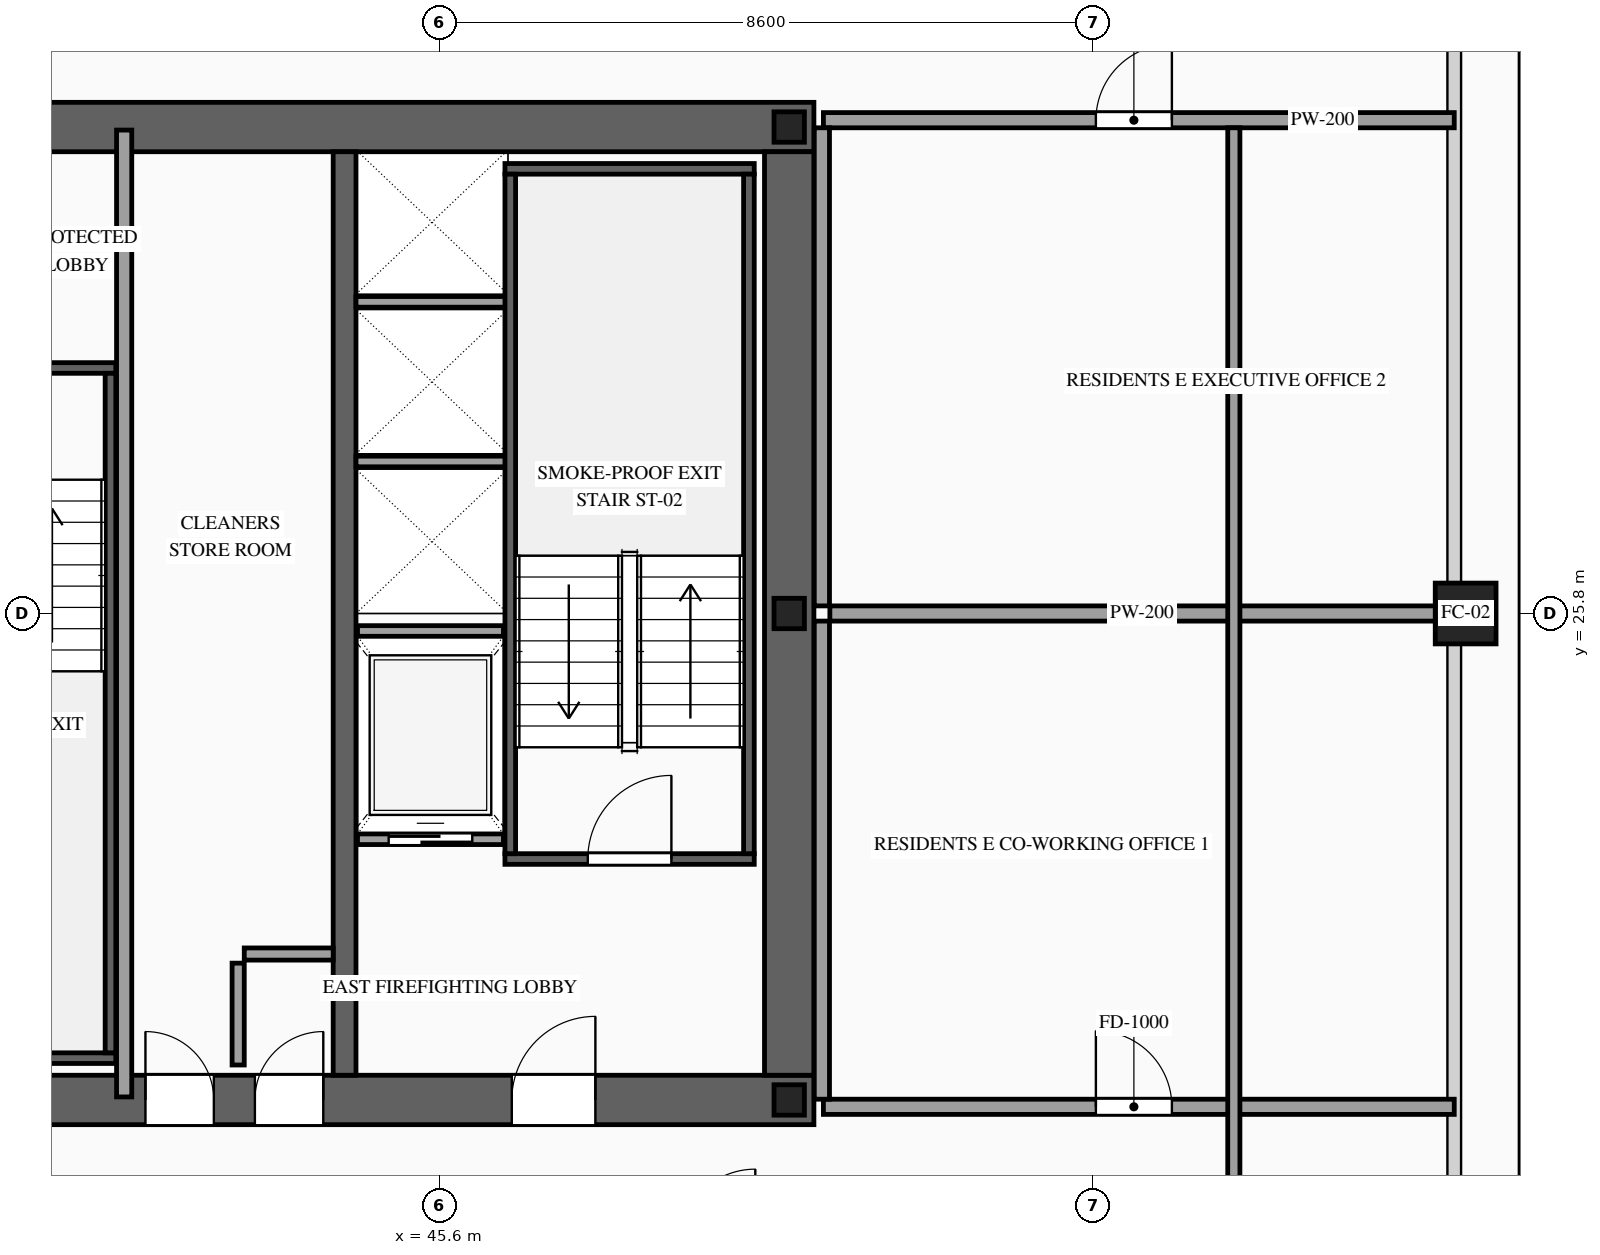
"""IFC4 building model, lengths in metres.
Left out: names, types, materials, properties, quantities, classifications, styles, units other than length and angle.
Written with IfcOpenShell. Run it as: python <this file> out.ifc"""

import sys

from ifc_helpers import new_model, si_unit, direction, frame, frame_2d, origin, origin_2d, place, context, subcontext, project, spatial, rectangle, hollow_rectangle, i_section, extrude, source, transform, mapped, element, fill, save


model = new_model("IFC4")
c1 = context("Model", 3, precision=1e-05, world=origin(), true_north=direction((0.0, 1.0)))
c2 = subcontext(c1, "Body", "Model", "MODEL_VIEW")
j1 = project(units=[si_unit("LENGTHUNIT", "METRE"), si_unit("PLANEANGLEUNIT", "RADIAN")], contexts=[c1])
p1 = place(None, origin())
s1 = spatial("IfcSite", under=j1, at=p1, CompositionType="ELEMENT")
p2 = place(p1, origin())
s2 = spatial("IfcBuilding", under=s1, at=p2, CompositionType="ELEMENT")
p3 = place(p2, frame((0.0, 0.0, 202.0)))
s3 = spatial("IfcBuildingStorey", under=s2, at=p3, CompositionType="ELEMENT", Elevation=202.0)
p4 = place(p3, frame((23.475, 19.4, 0.0), z_axis=(0.0, 0.0, 1.0), x_axis=(1.0, 0.0, 0.0)))
e1 = element("IfcWall", 1, at=p4, inside=s3, PredefinedType="SHEAR", context=c2, shape_type="SweptSolid", body=[
    extrude(rectangle(XDim=27.05, YDim=0.65, at=frame_2d((13.525, 0.0))), origin(), (0.0, 0.0, 1.0), 3.5),
])
p5 = place(p4, frame((1.975, 0.0, 0.0)))
e2 = element("IfcOpeningElement", 2, at=p5, cuts=e1, PredefinedType="OPENING", context=c2, shape_type="SweptSolid", body=[
    extrude(rectangle(XDim=1.1, YDim=2.2, at=frame_2d((0.55, 1.1))), frame((0.0, 0.34, 0.0), z_axis=(0.0, -1.0, 0.0), x_axis=(1.0, 0.0, 0.0)), (0.0, 0.0, 1.0), 0.68),
])
p6 = place(p4, frame((9.875, 0.0, 0.0)))
e3 = element("IfcOpeningElement", 3, at=p6, cuts=e1, PredefinedType="OPENING", context=c2, shape_type="SweptSolid", body=[
    extrude(rectangle(XDim=1.1, YDim=2.2, at=frame_2d((0.55, 1.1))), frame((0.0, 0.34, 0.0), z_axis=(0.0, -1.0, 0.0), x_axis=(1.0, 0.0, 0.0)), (0.0, 0.0, 1.0), 0.68),
])
p7 = place(p4, frame((23.075, 0.0, 0.0)))
e4 = element("IfcOpeningElement", 4, at=p7, cuts=e1, PredefinedType="OPENING", context=c2, shape_type="SweptSolid", body=[
    extrude(rectangle(XDim=1.1, YDim=2.2, at=frame_2d((0.55, 1.1))), frame((0.0, 0.34, 0.0), z_axis=(0.0, -1.0, 0.0), x_axis=(1.0, 0.0, 0.0)), (0.0, 0.0, 1.0), 0.68),
])
p8 = place(p4, frame((19.695, 0.0, 0.0)))
e5 = element("IfcOpeningElement", 5, at=p8, cuts=e1, PredefinedType="OPENING", context=c2, shape_type="SweptSolid", body=[
    extrude(rectangle(XDim=0.9, YDim=2.15, at=frame_2d((0.45, 1.075))), frame((0.0, 0.34, 0.0), z_axis=(0.0, -1.0, 0.0), x_axis=(1.0, 0.0, 0.0)), (0.0, 0.0, 1.0), 0.68),
])
p9 = place(p4, frame((18.255, 0.0, 0.0)))
e6 = element("IfcOpeningElement", 6, at=p9, cuts=e1, PredefinedType="OPENING", context=c2, shape_type="SweptSolid", body=[
    extrude(rectangle(XDim=0.9, YDim=2.15, at=frame_2d((0.45, 1.075))), frame((0.0, 0.34, 0.0), z_axis=(0.0, -1.0, 0.0), x_axis=(1.0, 0.0, 0.0)), (0.0, 0.0, 1.0), 0.68),
])
p10 = place(p3, frame((23.475, 32.2, 0.0), z_axis=(0.0, 0.0, 1.0), x_axis=(1.0, 0.0, 0.0)))
e7 = element("IfcWall", 7, at=p10, inside=s3, PredefinedType="SHEAR", context=c2, shape_type="SweptSolid", body=[
    extrude(rectangle(XDim=27.05, YDim=0.65, at=frame_2d((13.525, 0.0))), origin(), (0.0, 0.0, 1.0), 3.5),
])
p11 = place(p10, frame((4.595, 0.0, 0.0)))
e8 = element("IfcOpeningElement", 8, at=p11, cuts=e7, PredefinedType="OPENING", context=c2, shape_type="SweptSolid", body=[
    extrude(rectangle(XDim=0.9, YDim=2.15, at=frame_2d((0.45, 1.075))), frame((0.0, 0.34, 0.0), z_axis=(0.0, -1.0, 0.0), x_axis=(1.0, 0.0, 0.0)), (0.0, 0.0, 1.0), 0.68),
])
p12 = place(p10, frame((9.875, 0.0, 0.0)))
e9 = element("IfcOpeningElement", 9, at=p12, cuts=e7, PredefinedType="OPENING", context=c2, shape_type="SweptSolid", body=[
    extrude(rectangle(XDim=1.1, YDim=2.2, at=frame_2d((0.55, 1.1))), frame((0.0, 0.34, 0.0), z_axis=(0.0, -1.0, 0.0), x_axis=(1.0, 0.0, 0.0)), (0.0, 0.0, 1.0), 0.68),
])
p13 = place(p10, frame((15.725, 0.0, 0.0)))
e10 = element("IfcOpeningElement", 10, at=p13, cuts=e7, PredefinedType="OPENING", context=c2, shape_type="SweptSolid", body=[
    extrude(rectangle(XDim=1.1, YDim=2.2, at=frame_2d((0.55, 1.1))), frame((0.0, 0.34, 0.0), z_axis=(0.0, -1.0, 0.0), x_axis=(1.0, 0.0, 0.0)), (0.0, 0.0, 1.0), 0.68),
])
m1 = source(origin(), c2, "Body", "SweptSolid", [
    extrude(rectangle(XDim=12.15, YDim=0.65, at=frame_2d((6.075, 0.0))), origin(), (0.0, 0.0, 1.0), 3.5),
])
p14 = place(p3, frame((50.2, 19.725, 0.0), z_axis=(0.0, 0.0, 1.0), x_axis=(0.0, 1.0, 0.0)))
e11 = element("IfcWall", 11, at=p14, inside=s3, PredefinedType="SHEAR", context=c2, shape_type="MappedRepresentation", body=[
    mapped(m1, transform((0.0, 0.0, 0.0), scale=1.0)),
])
m2 = source(origin(), c2, "Body", "SweptSolid", [
    extrude(rectangle(XDim=12.15, YDim=0.3, at=frame_2d((6.075, 0.0))), origin(), (0.0, 0.0, 1.0), 3.5),
])
p15 = place(p3, frame((44.35, 19.725, 0.0), z_axis=(0.0, 0.0, 1.0), x_axis=(0.0, 1.0, 0.0)))
e12 = element("IfcWall", 12, at=p15, inside=s3, PredefinedType="SOLIDWALL", context=c2, shape_type="MappedRepresentation", body=[
    mapped(m2, transform((0.0, 0.0, 0.0), scale=1.0)),
])
m3 = source(origin(), c2, "Body", "SweptSolid", [
    extrude(i_section(OverallWidth=0.4, OverallDepth=0.4, WebThickness=0.013, FlangeThickness=0.021, at=origin_2d()), origin(), (0.0, 0.0, 1.0), 3.5),
])
for number, where, z_axis, x_axis in (
    (13, (50.2, 19.4, 0.0), (0.0, 0.0, 1.0), (1.0, 0.0, 0.0)),
    (14, (50.2, 25.8, 0.0), (0.0, 0.0, 1.0), (1.0, 0.0, 0.0)),
    (15, (50.2, 32.2, 0.0), (0.0, 0.0, 1.0), (1.0, 0.0, 0.0)),
):
    element("IfcColumn", number, at=place(p3, frame(where, z_axis=z_axis, x_axis=x_axis)), inside=s3, PredefinedType="COLUMN", context=c2, shape_type="MappedRepresentation", body=[
        mapped(m3, transform((0.0, 0.0, 0.0), scale=1.0)),
    ])
m4 = source(origin(), c2, "Body", "SweptSolid", [
    extrude(hollow_rectangle(XDim=0.8, YDim=0.8, WallThickness=0.036, at=origin_2d()), origin(), (0.0, 0.0, 1.0), 3.5),
])
p16 = place(p3, frame((59.1, 25.8, 0.0), z_axis=(0.0, 0.0, 1.0), x_axis=(1.0, 0.0, 0.0)))
e16 = element("IfcColumn", 16, at=p16, inside=s3, PredefinedType="COLUMN", context=c2, shape_type="MappedRepresentation", body=[
    mapped(m4, transform((0.0, 0.0, 0.0), scale=1.0)),
])
p17 = place(p3, frame((44.52, 22.83, 0.0), z_axis=(0.0, 0.0, 1.0), x_axis=(1.0, 0.0, 0.0)))
e17 = element("IfcWall", 17, at=p17, inside=s3, PredefinedType="SOLIDWALL", context=c2, shape_type="SweptSolid", body=[
    extrude(rectangle(XDim=1.92, YDim=0.14, at=frame_2d((0.96, 0.0))), origin(), (0.0, 0.0, 1.0), 3.28),
])
p18 = place(p17, frame((0.41, 0.0, 0.0)))
e18 = element("IfcOpeningElement", 18, at=p18, cuts=e17, PredefinedType="OPENING", context=c2, shape_type="SweptSolid", body=[
    extrude(rectangle(XDim=1.1, YDim=2.2, at=frame_2d((0.55, 1.1))), frame((0.0, 0.085, 0.0), z_axis=(0.0, -1.0, 0.0), x_axis=(1.0, 0.0, 0.0)), (0.0, 0.0, 1.0), 0.17),
])
m5 = source(origin(), c2, "Body", "SweptSolid", [
    extrude(rectangle(XDim=1.92, YDim=0.14, at=frame_2d((0.96, 0.0))), origin(), (0.0, 0.0, 1.0), 3.28),
])
p19 = place(p3, frame((44.52, 25.57, 0.0), z_axis=(0.0, 0.0, 1.0), x_axis=(1.0, 0.0, 0.0)))
e19 = element("IfcWall", 19, at=p19, inside=s3, PredefinedType="SOLIDWALL", context=c2, shape_type="MappedRepresentation", body=[
    mapped(m5, transform((0.0, 0.0, 0.0), scale=1.0)),
])
m6 = source(origin(), c2, "Body", "SweptSolid", [
    extrude(rectangle(XDim=2.0, YDim=0.14, at=frame_2d((1.0, 0.0))), origin(), (0.0, 0.0, 1.0), 3.28),
])
for number, where, z_axis, x_axis in (
    (20, (44.5, 27.8, 0.0), (0.0, 0.0, 1.0), (1.0, 0.0, 0.0)),
    (21, (44.5, 29.9, 0.0), (0.0, 0.0, 1.0), (1.0, 0.0, 0.0)),
):
    element("IfcWall", number, at=place(p3, frame(where, z_axis=z_axis, x_axis=x_axis)), inside=s3, PredefinedType="SOLIDWALL", context=c2, shape_type="MappedRepresentation", body=[
        mapped(m6, transform((0.0, 0.0, 0.0), scale=1.0)),
    ])
p20 = place(p3, frame((46.46, 22.57, 0.0), z_axis=(0.0, 0.0, 1.0), x_axis=(1.0, 0.0, 0.0)))
e22 = element("IfcWall", 22, at=p20, inside=s3, PredefinedType="SOLIDWALL", context=c2, shape_type="SweptSolid", body=[
    extrude(rectangle(XDim=3.28, YDim=0.14, at=frame_2d((1.64, 0.0))), origin(), (0.0, 0.0, 1.0), 3.28),
])
p21 = place(p20, frame((1.09, 0.0, 0.0)))
e23 = element("IfcOpeningElement", 23, at=p21, cuts=e22, PredefinedType="OPENING", context=c2, shape_type="SweptSolid", body=[
    extrude(rectangle(XDim=1.1, YDim=2.2, at=frame_2d((0.55, 1.1))), frame((0.0, 0.085, 0.0), z_axis=(0.0, -1.0, 0.0), x_axis=(1.0, 0.0, 0.0)), (0.0, 0.0, 1.0), 0.17),
])
m7 = source(origin(), c2, "Body", "SweptSolid", [
    extrude(rectangle(XDim=3.28, YDim=0.14, at=frame_2d((1.64, 0.0))), origin(), (0.0, 0.0, 1.0), 3.28),
])
p22 = place(p3, frame((46.46, 31.65, 0.0), z_axis=(0.0, 0.0, 1.0), x_axis=(1.0, 0.0, 0.0)))
e24 = element("IfcWall", 24, at=p22, inside=s3, PredefinedType="SOLIDWALL", context=c2, shape_type="MappedRepresentation", body=[
    mapped(m7, transform((0.0, 0.0, 0.0), scale=1.0)),
])
m8 = source(origin(), c2, "Body", "SweptSolid", [
    extrude(rectangle(XDim=8.94, YDim=0.14, at=frame_2d((4.47, 0.0))), origin(), (0.0, 0.0, 1.0), 3.28),
])
for number, where, z_axis, x_axis in (
    (25, (46.53, 22.64, 0.0), (0.0, 0.0, 1.0), (0.0, 1.0, 0.0)),
    (26, (49.67, 22.64, 0.0), (0.0, 0.0, 1.0), (0.0, 1.0, 0.0)),
):
    element("IfcWall", number, at=place(p3, frame(where, z_axis=z_axis, x_axis=x_axis)), inside=s3, PredefinedType="SOLIDWALL", context=c2, shape_type="MappedRepresentation", body=[
        mapped(m8, transform((0.0, 0.0, 0.0), scale=1.0)),
    ])
p23 = place(p3, frame((38.2, 29.03, 0.0), z_axis=(0.0, 0.0, 1.0), x_axis=(1.0, 0.0, 0.0)))
e27 = element("IfcWall", 27, at=p23, inside=s3, PredefinedType="SOLIDWALL", context=c2, shape_type="SweptSolid", body=[
    extrude(rectangle(XDim=3.14, YDim=0.14, at=frame_2d((1.57, 0.0))), origin(), (0.0, 0.0, 1.0), 3.28),
])
p24 = place(p23, frame((1.02, 0.0, 0.0)))
e28 = element("IfcOpeningElement", 28, at=p24, cuts=e27, PredefinedType="OPENING", context=c2, shape_type="SweptSolid", body=[
    extrude(rectangle(XDim=1.1, YDim=2.2, at=frame_2d((0.55, 1.1))), frame((0.0, 0.085, 0.0), z_axis=(0.0, -1.0, 0.0), x_axis=(1.0, 0.0, 0.0)), (0.0, 0.0, 1.0), 0.17),
])
m9 = source(origin(), c2, "Body", "SweptSolid", [
    extrude(rectangle(XDim=3.14, YDim=0.14, at=frame_2d((1.57, 0.0))), origin(), (0.0, 0.0, 1.0), 3.28),
])
p25 = place(p3, frame((38.2, 19.95, 0.0), z_axis=(0.0, 0.0, 1.0), x_axis=(1.0, 0.0, 0.0)))
e29 = element("IfcWall", 29, at=p25, inside=s3, PredefinedType="SOLIDWALL", context=c2, shape_type="MappedRepresentation", body=[
    mapped(m9, transform((0.0, 0.0, 0.0), scale=1.0)),
])
m10 = source(origin(), c2, "Body", "SweptSolid", [
    extrude(rectangle(XDim=8.94, YDim=0.14, at=frame_2d((4.47, 0.0))), origin(), (0.0, 0.0, 1.0), 3.28),
])
p26 = place(p3, frame((41.27, 20.02, 0.0), z_axis=(0.0, 0.0, 1.0), x_axis=(0.0, 1.0, 0.0)))
e30 = element("IfcWall", 30, at=p26, inside=s3, PredefinedType="SOLIDWALL", context=c2, shape_type="MappedRepresentation", body=[
    mapped(m10, transform((0.0, 0.0, 0.0), scale=1.0)),
])
m11 = source(origin(), c2, "Body", "SweptSolid", [
    extrude(rectangle(XDim=1.34, YDim=0.16, at=frame_2d((0.67, 0.0))), origin(), (0.0, 0.0, 1.0), 3.28),
])
p27 = place(p3, frame((42.95, 19.86, 0.0), z_axis=(0.0, 0.0, 1.0), x_axis=(0.0, 1.0, 0.0)))
e31 = element("IfcWall", 31, at=p27, inside=s3, PredefinedType="PARTITIONING", context=c2, shape_type="MappedRepresentation", body=[
    mapped(m11, transform((0.0, 0.0, 0.0), scale=1.0)),
])
m12 = source(origin(), c2, "Body", "SweptSolid", [
    extrude(rectangle(XDim=1.17, YDim=0.16, at=frame_2d((0.585, 0.0))), origin(), (0.0, 0.0, 1.0), 3.28),
])
p28 = place(p3, frame((43.03, 21.32, 0.0), z_axis=(0.0, 0.0, 1.0), x_axis=(1.0, 0.0, 0.0)))
e32 = element("IfcWall", 32, at=p28, inside=s3, PredefinedType="PARTITIONING", context=c2, shape_type="MappedRepresentation", body=[
    mapped(m12, transform((0.0, 0.0, 0.0), scale=1.0)),
])
m13 = source(origin(), c2, "Body", "SweptSolid", [
    extrude(rectangle(XDim=12.72, YDim=0.2, at=frame_2d((6.36, 0.0))), origin(), (0.0, 0.0, 1.0), 3.28),
])
p29 = place(p3, frame((41.45, 19.44, 0.0), z_axis=(0.0, 0.0, 1.0), x_axis=(0.0, 1.0, 0.0)))
e33 = element("IfcWall", 33, at=p29, inside=s3, PredefinedType="PARTITIONING", context=c2, shape_type="MappedRepresentation", body=[
    mapped(m13, transform((0.0, 0.0, 0.0), scale=1.0)),
])
p30 = place(p3, frame((50.65, 19.31, 0.0), z_axis=(0.0, 0.0, 1.0), x_axis=(1.0, 0.0, 0.0)))
e34 = element("IfcWall", 34, at=p30, inside=s3, PredefinedType="PARTITIONING", context=c2, shape_type="SweptSolid", body=[
    extrude(rectangle(XDim=8.3, YDim=0.2, at=frame_2d((4.15, 0.0))), origin(), (0.0, 0.0, 1.0), 2.775),
])
p31 = place(p30, frame((3.585, 0.0, 0.0)))
e35 = element("IfcOpeningElement", 35, at=p31, cuts=e34, PredefinedType="OPENING", context=c2, shape_type="SweptSolid", body=[
    extrude(rectangle(XDim=1.0, YDim=2.2, at=frame_2d((0.5, 1.1))), frame((0.0, 0.115, 0.0), z_axis=(0.0, -1.0, 0.0), x_axis=(1.0, 0.0, 0.0)), (0.0, 0.0, 1.0), 0.23),
])
m14 = source(origin(), c2, "Body", "SweptSolid", [
    extrude(rectangle(XDim=8.215, YDim=0.2, at=frame_2d((4.107, 0.0))), origin(), (0.0, 0.0, 1.0), 2.687),
])
p32 = place(p3, frame((50.735, 25.8, 0.0), z_axis=(0.0, 0.0, 1.0), x_axis=(1.0, 0.0, 0.0)))
e36 = element("IfcWall", 36, at=p32, inside=s3, PredefinedType="PARTITIONING", context=c2, shape_type="MappedRepresentation", body=[
    mapped(m14, transform((0.0, 0.0, 0.0), scale=1.0)),
])
m15 = source(origin(), c2, "Body", "SweptSolid", [
    extrude(rectangle(XDim=6.29, YDim=0.2, at=frame_2d((3.145, 0.0))), origin(), (0.0, 0.0, 1.0), 3.28),
])
p33 = place(p3, frame((50.63, 19.41, 0.0), z_axis=(0.0, 0.0, 1.0), x_axis=(0.0, 1.0, 0.0)))
e37 = element("IfcWall", 37, at=p33, inside=s3, PredefinedType="PARTITIONING", context=c2, shape_type="MappedRepresentation", body=[
    mapped(m15, transform((0.0, 0.0, 0.0), scale=1.0)),
])
p34 = place(p3, frame((50.65, 32.29, 0.0), z_axis=(0.0, 0.0, 1.0), x_axis=(1.0, 0.0, 0.0)))
e38 = element("IfcWall", 38, at=p34, inside=s3, PredefinedType="PARTITIONING", context=c2, shape_type="SweptSolid", body=[
    extrude(rectangle(XDim=8.3, YDim=0.2, at=frame_2d((4.15, 0.0))), origin(), (0.0, 0.0, 1.0), 2.775),
])
p35 = place(p34, frame((3.585, 0.0, 0.0)))
e39 = element("IfcOpeningElement", 39, at=p35, cuts=e38, PredefinedType="OPENING", context=c2, shape_type="SweptSolid", body=[
    extrude(rectangle(XDim=1.0, YDim=2.2, at=frame_2d((0.5, 1.1))), frame((0.0, 0.115, 0.0), z_axis=(0.0, -1.0, 0.0), x_axis=(1.0, 0.0, 0.0)), (0.0, 0.0, 1.0), 0.23),
])
m16 = source(origin(), c2, "Body", "SweptSolid", [
    extrude(rectangle(XDim=28.19, YDim=0.16, at=frame_2d((14.095, 0.0))), origin(), (0.0, 0.0, 1.0), 3.28),
])
p36 = place(p3, frame((56.05, 4.0, 0.0), z_axis=(0.0, 0.0, 1.0), x_axis=(0.0, 1.0, 0.0)))
e40 = element("IfcWall", 40, at=p36, inside=s3, PredefinedType="PARTITIONING", context=c2, shape_type="MappedRepresentation", body=[
    mapped(m16, transform((0.0, 0.0, 0.0), scale=1.0)),
])
p37 = place(p3, frame((50.63, 25.9, 0.0), z_axis=(0.0, 0.0, 1.0), x_axis=(0.0, 1.0, 0.0)))
e41 = element("IfcWall", 41, at=p37, inside=s3, PredefinedType="PARTITIONING", context=c2, shape_type="MappedRepresentation", body=[
    mapped(m15, transform((0.0, 0.0, 0.0), scale=1.0)),
])
m17 = source(origin(), c2, "Body", "SweptSolid", [
    extrude(rectangle(XDim=1.1, YDim=2.2, at=frame_2d((0.55, 1.1))), frame((0.0, 0.025, 0.0), z_axis=(0.0, -1.0, 0.0), x_axis=(1.0, 0.0, 0.0)), (0.0, 0.0, 1.0), 0.05),
])
p38 = place(p18, origin())
e42 = element("IfcDoor", 42, at=p38, inside=s3, OperationType="SLIDING_TO_RIGHT", PredefinedType="DOOR", context=c2, shape_type="MappedRepresentation", body=[
    mapped(m17, transform((0.0, 0.0, 0.0), scale=1.0)),
])
fill(e18, e42)
m18 = source(origin(), c2, "Body", "SweptSolid", [
    extrude(rectangle(XDim=1.1, YDim=2.2, at=frame_2d((0.55, 1.1))), frame((0.0, 0.025, 0.0), z_axis=(0.0, -1.0, 0.0), x_axis=(1.0, 0.0, 0.0)), (0.0, 0.0, 1.0), 0.05),
])
p39 = place(p21, origin())
e43 = element("IfcDoor", 43, at=p39, inside=s3, OperationType="SINGLE_SWING_RIGHT", PredefinedType="DOOR", context=c2, shape_type="MappedRepresentation", body=[
    mapped(m18, transform((0.0, 0.0, 0.0), scale=1.0)),
])
fill(e23, e43)
p40 = place(p7, origin())
e44 = element("IfcDoor", 44, at=p40, inside=s3, OperationType="SINGLE_SWING_RIGHT", PredefinedType="DOOR", context=c2, shape_type="MappedRepresentation", body=[
    mapped(m18, transform((0.0, 0.0, 0.0), scale=1.0)),
])
fill(e4, e44)
m19 = source(origin(), c2, "Body", "SweptSolid", [
    extrude(rectangle(XDim=0.9, YDim=2.15, at=frame_2d((0.45, 1.075))), frame((0.0, 0.025, 0.0), z_axis=(0.0, -1.0, 0.0), x_axis=(1.0, 0.0, 0.0)), (0.0, 0.0, 1.0), 0.05),
])
p41 = place(p8, origin())
e45 = element("IfcDoor", 45, at=p41, inside=s3, OperationType="SINGLE_SWING_RIGHT", PredefinedType="DOOR", context=c2, shape_type="MappedRepresentation", body=[
    mapped(m19, transform((0.0, 0.0, 0.0), scale=1.0)),
])
fill(e5, e45)
p42 = place(p9, origin())
e46 = element("IfcDoor", 46, at=p42, inside=s3, OperationType="SINGLE_SWING_LEFT", PredefinedType="DOOR", context=c2, shape_type="MappedRepresentation", body=[
    mapped(m19, transform((0.0, 0.0, 0.0), scale=1.0)),
])
fill(e6, e46)
m20 = source(origin(), c2, "Body", "SweptSolid", [
    extrude(rectangle(XDim=1.0, YDim=2.2, at=frame_2d((0.5, 1.1))), frame((0.0, 0.025, 0.0), z_axis=(0.0, -1.0, 0.0), x_axis=(1.0, 0.0, 0.0)), (0.0, 0.0, 1.0), 0.05),
])
p43 = place(p31, origin())
e47 = element("IfcDoor", 47, at=p43, inside=s3, OperationType="SINGLE_SWING_LEFT", PredefinedType="DOOR", context=c2, shape_type="MappedRepresentation", body=[
    mapped(m20, transform((0.0, 0.0, 0.0), scale=1.0)),
])
fill(e35, e47)
p44 = place(p35, origin())
e48 = element("IfcDoor", 48, at=p44, inside=s3, OperationType="SINGLE_SWING_RIGHT", PredefinedType="DOOR", context=c2, shape_type="MappedRepresentation", body=[
    mapped(m20, transform((0.0, 0.0, 0.0), scale=1.0)),
])
fill(e39, e48)
save(model, sys.argv[1])
